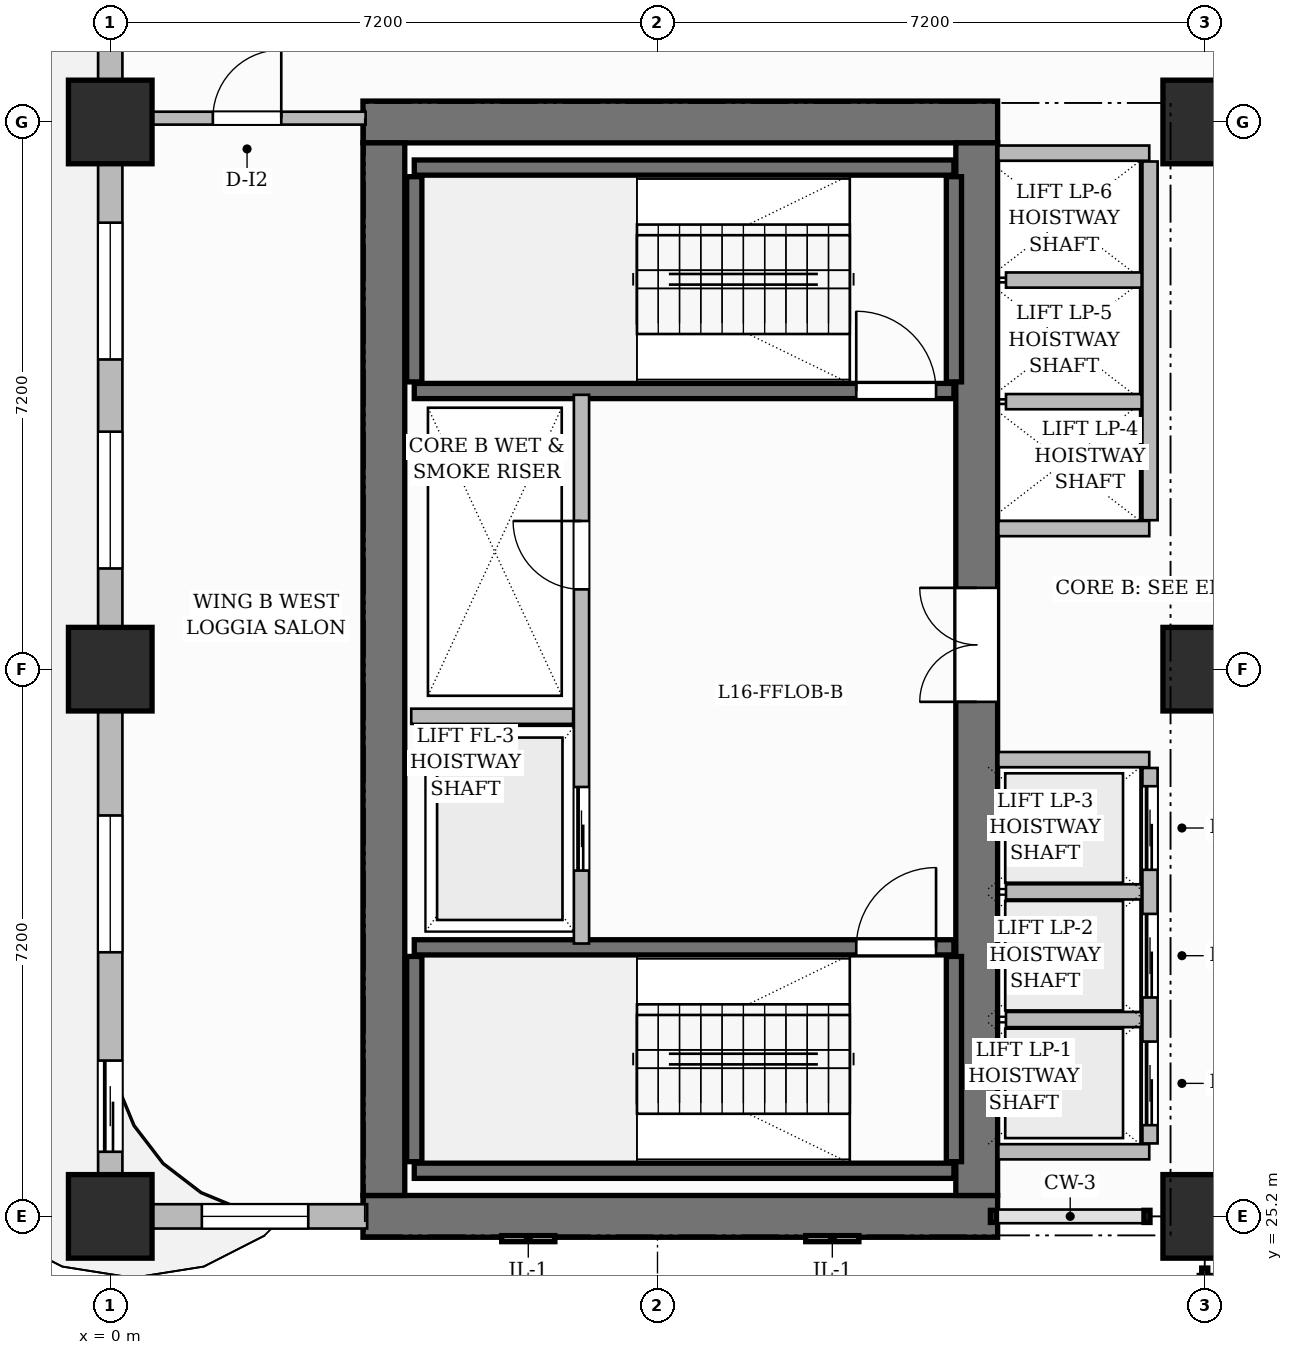
"""IFC4 building model, lengths in metres.
Left out: names, types, materials, properties, quantities, classifications, styles, units other than length and angle.
Written with IfcOpenShell. Run it as: python <this file> out.ifc"""

import sys

from ifc_helpers import new_model, si_unit, direction, frame, frame_2d, origin, origin_2d, place, context, subcontext, project, spatial, rectangle, extrude, source, transform, mapped, element, fill, save


model = new_model("IFC4")
c1 = context("Model", 3, precision=1e-05, world=origin(), true_north=direction((0.0, 1.0)))
c2 = subcontext(c1, "Body", "Model", "MODEL_VIEW")
j1 = project(units=[si_unit("LENGTHUNIT", "METRE"), si_unit("PLANEANGLEUNIT", "RADIAN")], contexts=[c1])
p1 = place(None, origin())
s1 = spatial("IfcSite", under=j1, at=p1, CompositionType="ELEMENT")
p2 = place(p1, origin())
s2 = spatial("IfcBuilding", under=s1, at=p2, CompositionType="ELEMENT")
p3 = place(p2, frame((0.0, 0.0, 69.4)))
s3 = spatial("IfcBuildingStorey", under=s2, at=p3, CompositionType="ELEMENT", Elevation=69.4)
for number, where, z_axis, x_axis in (
    (1, (3.325, 25.2, 0.0), (0.0, 0.0, 1.0), (1.0, 0.0, 0.0)),
    (2, (3.325, 39.6, 0.0), (0.0, 0.0, 1.0), (1.0, 0.0, 0.0)),
):
    element("IfcWall", number, at=place(p3, frame(where, z_axis=z_axis, x_axis=x_axis)), inside=s3, PredefinedType="SHEAR", context=c2, shape_type="SweptSolid", body=[
        extrude(rectangle(XDim=8.35, YDim=0.55, at=frame_2d((4.175, 0.0))), origin(), (0.0, 0.0, 1.0), 3.7),
    ])
p4 = place(p3, frame((3.6, 25.475, 0.0), z_axis=(0.0, 0.0, 1.0), x_axis=(0.0, 1.0, 0.0)))
e3 = element("IfcWall", 3, at=p4, inside=s3, PredefinedType="SHEAR", context=c2, shape_type="SweptSolid", body=[
    extrude(rectangle(XDim=13.85, YDim=0.55, at=frame_2d((6.925, 0.0))), origin(), (0.0, 0.0, 1.0), 3.7),
])
p5 = place(p3, frame((11.4, 25.475, 0.0), z_axis=(0.0, 0.0, 1.0), x_axis=(0.0, 1.0, 0.0)))
e4 = element("IfcWall", 4, at=p5, inside=s3, PredefinedType="SHEAR", context=c2, shape_type="SweptSolid", body=[
    extrude(rectangle(XDim=13.85, YDim=0.55, at=frame_2d((6.925, 0.0))), origin(), (0.0, 0.0, 1.0), 3.7),
])
p6 = place(p5, frame((6.495, 0.0, 0.0)))
e5 = element("IfcOpeningElement", 5, at=p6, cuts=e4, PredefinedType="OPENING", context=c2, shape_type="SweptSolid", body=[
    extrude(rectangle(XDim=1.5, YDim=2.2, at=frame_2d((0.75, 1.1))), frame((0.0, 0.285, 0.0), z_axis=(0.0, -1.0, 0.0), x_axis=(1.0, 0.0, 0.0)), (0.0, 0.0, 1.0), 0.57),
])
m1 = source(origin(), c2, "Body", "SweptSolid", [
    extrude(rectangle(XDim=1.1, YDim=1.1, at=origin_2d()), origin(), (0.0, 0.0, 1.0), 3.7),
])
for number, where, z_axis, x_axis in (
    (6, (0.0, 25.2, 0.0), (0.0, 0.0, 1.0), (1.0, 0.0, 0.0)),
    (7, (0.0, 32.4, 0.0), (0.0, 0.0, 1.0), (1.0, 0.0, 0.0)),
    (8, (0.0, 39.6, 0.0), (0.0, 0.0, 1.0), (1.0, 0.0, 0.0)),
    (9, (14.4, 25.2, 0.0), (0.0, 0.0, 1.0), (1.0, 0.0, 0.0)),
    (10, (14.4, 32.4, 0.0), (0.0, 0.0, 1.0), (1.0, 0.0, 0.0)),
    (11, (14.4, 39.6, 0.0), (0.0, 0.0, 1.0), (1.0, 0.0, 0.0)),
):
    element("IfcColumn", number, at=place(p3, frame(where, z_axis=z_axis, x_axis=x_axis)), inside=s3, PredefinedType="COLUMN", context=c2, shape_type="MappedRepresentation", body=[
        mapped(m1, transform((0.0, 0.0, 0.0), scale=1.0)),
    ])
p7 = place(p3, frame((4.0, 25.8, 0.0), z_axis=(0.0, 0.0, 1.0), x_axis=(1.0, 0.0, 0.0)))
e12 = element("IfcWall", 12, at=p7, inside=s3, PredefinedType="SHEAR", context=c2, shape_type="SweptSolid", body=[
    extrude(rectangle(XDim=7.1, YDim=0.2, at=frame_2d((3.55, 0.0))), origin(), (0.0, 0.0, 1.0), 3.7),
])
for number, where, z_axis, x_axis in (
    (13, (4.0, 25.92, 0.0), (0.0, 0.0, 1.0), (0.0, 1.0, 0.0)),
    (14, (11.1, 25.92, 0.0), (0.0, 0.0, 1.0), (0.0, 1.0, 0.0)),
):
    element("IfcWall", number, at=place(p3, frame(where, z_axis=z_axis, x_axis=x_axis)), inside=s3, PredefinedType="SHEAR", context=c2, shape_type="SweptSolid", body=[
        extrude(rectangle(XDim=2.7, YDim=0.2, at=frame_2d((1.35, 0.0))), origin(), (0.0, 0.0, 1.0), 3.7),
    ])
p8 = place(p3, frame((4.0, 28.74, 0.0), z_axis=(0.0, 0.0, 1.0), x_axis=(1.0, 0.0, 0.0)))
e15 = element("IfcWall", 15, at=p8, inside=s3, PredefinedType="SHEAR", context=c2, shape_type="SweptSolid", body=[
    extrude(rectangle(XDim=7.1, YDim=0.2, at=frame_2d((3.55, 0.0))), origin(), (0.0, 0.0, 1.0), 3.7),
])
p9 = place(p8, frame((5.815, 0.0, 0.0)))
e16 = element("IfcOpeningElement", 16, at=p9, cuts=e15, PredefinedType="OPENING", context=c2, shape_type="SweptSolid", body=[
    extrude(rectangle(XDim=1.05, YDim=2.2, at=frame_2d((0.525, 1.1))), frame((0.0, 0.11, 0.0), z_axis=(0.0, -1.0, 0.0), x_axis=(1.0, 0.0, 0.0)), (0.0, 0.0, 1.0), 0.22),
])
p10 = place(p3, frame((4.0, 39.0, 0.0), z_axis=(0.0, 0.0, 1.0), x_axis=(1.0, 0.0, 0.0)))
e17 = element("IfcWall", 17, at=p10, inside=s3, PredefinedType="SHEAR", context=c2, shape_type="SweptSolid", body=[
    extrude(rectangle(XDim=7.1, YDim=0.2, at=frame_2d((3.55, 0.0))), origin(), (0.0, 0.0, 1.0), 3.7),
])
for number, where, z_axis, x_axis in (
    (18, (4.0, 36.18, 0.0), (0.0, 0.0, 1.0), (0.0, 1.0, 0.0)),
    (19, (11.1, 36.18, 0.0), (0.0, 0.0, 1.0), (0.0, 1.0, 0.0)),
):
    element("IfcWall", number, at=place(p3, frame(where, z_axis=z_axis, x_axis=x_axis)), inside=s3, PredefinedType="SHEAR", context=c2, shape_type="SweptSolid", body=[
        extrude(rectangle(XDim=2.7, YDim=0.2, at=frame_2d((1.35, 0.0))), origin(), (0.0, 0.0, 1.0), 3.7),
    ])
p11 = place(p3, frame((4.0, 36.06, 0.0), z_axis=(0.0, 0.0, 1.0), x_axis=(1.0, 0.0, 0.0)))
e20 = element("IfcWall", 20, at=p11, inside=s3, PredefinedType="SHEAR", context=c2, shape_type="SweptSolid", body=[
    extrude(rectangle(XDim=7.1, YDim=0.2, at=frame_2d((3.55, 0.0))), origin(), (0.0, 0.0, 1.0), 3.7),
])
p12 = place(p11, frame((5.815, 0.0, 0.0)))
e21 = element("IfcOpeningElement", 21, at=p12, cuts=e20, PredefinedType="OPENING", context=c2, shape_type="SweptSolid", body=[
    extrude(rectangle(XDim=1.05, YDim=2.2, at=frame_2d((0.525, 1.1))), frame((0.0, 0.11, 0.0), z_axis=(0.0, -1.0, 0.0), x_axis=(1.0, 0.0, 0.0)), (0.0, 0.0, 1.0), 0.22),
])
p13 = place(p3, frame((6.2, 28.79, 0.0), z_axis=(0.0, 0.0, 1.0), x_axis=(0.0, 1.0, 0.0)))
e22 = element("IfcWall", 22, at=p13, inside=s3, PredefinedType="PARTITIONING", context=c2, shape_type="SweptSolid", body=[
    extrude(rectangle(XDim=7.22, YDim=0.2, at=frame_2d((3.61, 0.0))), origin(), (0.0, 0.0, 1.0), 3.45),
])
p14 = place(p13, frame((4.66, 0.0, 0.0)))
e23 = element("IfcOpeningElement", 23, at=p14, cuts=e22, PredefinedType="OPENING", context=c2, shape_type="SweptSolid", body=[
    extrude(rectangle(XDim=0.9, YDim=2.1, at=frame_2d((0.45, 1.05))), frame((0.0, 0.11, 0.0), z_axis=(0.0, -1.0, 0.0), x_axis=(1.0, 0.0, 0.0)), (0.0, 0.0, 1.0), 0.22),
])
p15 = place(p13, frame((0.96, 0.0, 0.0)))
e24 = element("IfcOpeningElement", 24, at=p15, cuts=e22, PredefinedType="OPENING", context=c2, shape_type="SweptSolid", body=[
    extrude(rectangle(XDim=1.1, YDim=2.2, at=frame_2d((0.55, 1.1))), frame((0.0, 0.11, 0.0), z_axis=(0.0, -1.0, 0.0), x_axis=(1.0, 0.0, 0.0)), (0.0, 0.0, 1.0), 0.22),
])
p16 = place(p3, frame((3.96, 31.78, 0.0), z_axis=(0.0, 0.0, 1.0), x_axis=(1.0, 0.0, 0.0)))
e25 = element("IfcWall", 25, at=p16, inside=s3, PredefinedType="PARTITIONING", context=c2, shape_type="SweptSolid", body=[
    extrude(rectangle(XDim=2.13, YDim=0.2, at=frame_2d((1.065, 0.0))), origin(), (0.0, 0.0, 1.0), 3.45),
])
for number, where, z_axis, x_axis in (
    (26, (11.685, 26.05, 0.0), (0.0, 0.0, 1.0), (1.0, 0.0, 0.0)),
    (27, (11.685, 31.21, 0.0), (0.0, 0.0, 1.0), (1.0, 0.0, 0.0)),
):
    element("IfcWall", number, at=place(p3, frame(where, z_axis=z_axis, x_axis=x_axis)), inside=s3, PredefinedType="PARTITIONING", context=c2, shape_type="SweptSolid", body=[
        extrude(rectangle(XDim=1.985, YDim=0.2, at=frame_2d((0.992, 0.0))), origin(), (0.0, 0.0, 1.0), 3.45),
    ])
p17 = place(p3, frame((13.68, 26.16, 0.0), z_axis=(0.0, 0.0, 1.0), x_axis=(0.0, 1.0, 0.0)))
e28 = element("IfcWall", 28, at=p17, inside=s3, PredefinedType="PARTITIONING", context=c2, shape_type="SweptSolid", body=[
    extrude(rectangle(XDim=4.94, YDim=0.2, at=frame_2d((2.47, 0.0))), origin(), (0.0, 0.0, 1.0), 3.45),
])
p18 = place(p17, frame((0.24, 0.0, 0.0)))
e29 = element("IfcOpeningElement", 29, at=p18, cuts=e28, PredefinedType="OPENING", context=c2, shape_type="SweptSolid", body=[
    extrude(rectangle(XDim=1.1, YDim=2.2, at=frame_2d((0.55, 1.1))), frame((0.0, 0.11, 0.0), z_axis=(0.0, -1.0, 0.0), x_axis=(1.0, 0.0, 0.0)), (0.0, 0.0, 1.0), 0.22),
])
p19 = place(p17, frame((1.92, 0.0, 0.0)))
e30 = element("IfcOpeningElement", 30, at=p19, cuts=e28, PredefinedType="OPENING", context=c2, shape_type="SweptSolid", body=[
    extrude(rectangle(XDim=1.1, YDim=2.2, at=frame_2d((0.55, 1.1))), frame((0.0, 0.11, 0.0), z_axis=(0.0, -1.0, 0.0), x_axis=(1.0, 0.0, 0.0)), (0.0, 0.0, 1.0), 0.22),
])
p20 = place(p17, frame((3.6, 0.0, 0.0)))
e31 = element("IfcOpeningElement", 31, at=p20, cuts=e28, PredefinedType="OPENING", context=c2, shape_type="SweptSolid", body=[
    extrude(rectangle(XDim=1.1, YDim=2.2, at=frame_2d((0.55, 1.1))), frame((0.0, 0.11, 0.0), z_axis=(0.0, -1.0, 0.0), x_axis=(1.0, 0.0, 0.0)), (0.0, 0.0, 1.0), 0.22),
])
for number, where, z_axis, x_axis in (
    (32, (11.785, 27.79, 0.0), (0.0, 0.0, 1.0), (1.0, 0.0, 0.0)),
    (33, (11.785, 29.47, 0.0), (0.0, 0.0, 1.0), (1.0, 0.0, 0.0)),
):
    element("IfcWall", number, at=place(p3, frame(where, z_axis=z_axis, x_axis=x_axis)), inside=s3, PredefinedType="PARTITIONING", context=c2, shape_type="SweptSolid", body=[
        extrude(rectangle(XDim=1.785, YDim=0.2, at=frame_2d((0.893, 0.0))), origin(), (0.0, 0.0, 1.0), 3.45),
    ])
for number, where, z_axis, x_axis in (
    (34, (11.685, 34.25, 0.0), (0.0, 0.0, 1.0), (1.0, 0.0, 0.0)),
    (35, (11.685, 39.19, 0.0), (0.0, 0.0, 1.0), (1.0, 0.0, 0.0)),
):
    element("IfcWall", number, at=place(p3, frame(where, z_axis=z_axis, x_axis=x_axis)), inside=s3, PredefinedType="PARTITIONING", context=c2, shape_type="SweptSolid", body=[
        extrude(rectangle(XDim=1.985, YDim=0.2, at=frame_2d((0.992, 0.0))), origin(), (0.0, 0.0, 1.0), 3.45),
    ])
p21 = place(p3, frame((13.68, 34.36, 0.0), z_axis=(0.0, 0.0, 1.0), x_axis=(0.0, 1.0, 0.0)))
e36 = element("IfcWall", 36, at=p21, inside=s3, PredefinedType="PARTITIONING", context=c2, shape_type="SweptSolid", body=[
    extrude(rectangle(XDim=4.72, YDim=0.2, at=frame_2d((2.36, 0.0))), origin(), (0.0, 0.0, 1.0), 3.45),
])
for number, where, z_axis, x_axis in (
    (37, (11.785, 35.92, 0.0), (0.0, 0.0, 1.0), (1.0, 0.0, 0.0)),
    (38, (11.785, 37.52, 0.0), (0.0, 0.0, 1.0), (1.0, 0.0, 0.0)),
):
    element("IfcWall", number, at=place(p3, frame(where, z_axis=z_axis, x_axis=x_axis)), inside=s3, PredefinedType="PARTITIONING", context=c2, shape_type="SweptSolid", body=[
        extrude(rectangle(XDim=1.785, YDim=0.2, at=frame_2d((0.893, 0.0))), origin(), (0.0, 0.0, 1.0), 3.45),
    ])
p22 = place(p3, frame((0.24, 39.65, 0.0), z_axis=(0.0, 0.0, 1.0), x_axis=(1.0, 0.0, 0.0)))
e39 = element("IfcWall", 39, at=p22, inside=s3, PredefinedType="PARTITIONING", context=c2, shape_type="SweptSolid", body=[
    extrude(rectangle(XDim=3.12, YDim=0.17, at=frame_2d((1.56, 0.0))), origin(), (0.0, 0.0, 1.0), 3.45),
])
p23 = place(p22, frame((1.11, 0.0, 0.0)))
e40 = element("IfcOpeningElement", 40, at=p23, cuts=e39, PredefinedType="OPENING", context=c2, shape_type="SweptSolid", body=[
    extrude(rectangle(XDim=0.9, YDim=2.15, at=frame_2d((0.45, 1.075))), frame((0.0, 0.095, 0.0), z_axis=(0.0, -1.0, 0.0), x_axis=(1.0, 0.0, 0.0)), (0.0, 0.0, 1.0), 0.19),
])
p24 = place(p3, frame((0.0, 25.2, 0.0), z_axis=(0.0, 0.0, 1.0), x_axis=(1.0, 0.0, 0.0)))
e41 = element("IfcWall", 41, at=p24, inside=s3, PredefinedType="SOLIDWALL", context=c2, shape_type="SweptSolid", body=[
    extrude(rectangle(XDim=3.38, YDim=0.32, at=frame_2d((1.69, 0.0))), origin(), (0.0, 0.0, 1.0), 3.45),
])
p25 = place(p24, frame((1.205, 0.0, 0.8)))
e42 = element("IfcOpeningElement", 42, at=p25, cuts=e41, PredefinedType="OPENING", context=c2, shape_type="SweptSolid", body=[
    extrude(rectangle(XDim=1.4, YDim=1.85, at=frame_2d((0.7, 0.925))), frame((0.0, 0.17, 0.0), z_axis=(0.0, -1.0, 0.0), x_axis=(1.0, 0.0, 0.0)), (0.0, 0.0, 1.0), 0.34),
])
p26 = place(p3, frame((0.0, 25.25, 0.0), z_axis=(0.0, 0.0, 1.0), x_axis=(0.0, 1.0, 0.0)))
e43 = element("IfcWall", 43, at=p26, inside=s3, PredefinedType="SOLIDWALL", context=c2, shape_type="SweptSolid", body=[
    extrude(rectangle(XDim=21.5, YDim=0.32, at=frame_2d((10.75, 0.0))), origin(), (0.0, 0.0, 1.0), 2.885),
])
p27 = place(p26, frame((18.45, 0.0, 0.0)))
e44 = element("IfcOpeningElement", 44, at=p27, cuts=e43, PredefinedType="OPENING", context=c2, shape_type="SweptSolid", body=[
    extrude(rectangle(XDim=1.2, YDim=2.2, at=frame_2d((0.6, 1.1))), frame((0.0, 0.17, 0.0), z_axis=(0.0, -1.0, 0.0), x_axis=(1.0, 0.0, 0.0)), (0.0, 0.0, 1.0), 0.34),
])
p28 = place(p26, frame((0.8, 0.0, 0.0)))
e45 = element("IfcOpeningElement", 45, at=p28, cuts=e43, PredefinedType="OPENING", context=c2, shape_type="SweptSolid", body=[
    extrude(rectangle(XDim=1.2, YDim=2.2, at=frame_2d((0.6, 1.1))), frame((0.0, 0.17, 0.0), z_axis=(0.0, -1.0, 0.0), x_axis=(1.0, 0.0, 0.0)), (0.0, 0.0, 1.0), 0.34),
])
p29 = place(p26, frame((3.425, 0.0, 0.8)))
e46 = element("IfcOpeningElement", 46, at=p29, cuts=e43, PredefinedType="OPENING", context=c2, shape_type="SweptSolid", body=[
    extrude(rectangle(XDim=1.8, YDim=1.85, at=frame_2d((0.9, 0.925))), frame((0.0, 0.17, 0.0), z_axis=(0.0, -1.0, 0.0), x_axis=(1.0, 0.0, 0.0)), (0.0, 0.0, 1.0), 0.34),
])
p30 = place(p26, frame((8.475, 0.0, 0.8)))
e47 = element("IfcOpeningElement", 47, at=p30, cuts=e43, PredefinedType="OPENING", context=c2, shape_type="SweptSolid", body=[
    extrude(rectangle(XDim=1.8, YDim=1.85, at=frame_2d((0.9, 0.925))), frame((0.0, 0.17, 0.0), z_axis=(0.0, -1.0, 0.0), x_axis=(1.0, 0.0, 0.0)), (0.0, 0.0, 1.0), 0.34),
])
p31 = place(p26, frame((11.225, 0.0, 0.8)))
e48 = element("IfcOpeningElement", 48, at=p31, cuts=e43, PredefinedType="OPENING", context=c2, shape_type="SweptSolid", body=[
    extrude(rectangle(XDim=1.8, YDim=1.85, at=frame_2d((0.9, 0.925))), frame((0.0, 0.17, 0.0), z_axis=(0.0, -1.0, 0.0), x_axis=(1.0, 0.0, 0.0)), (0.0, 0.0, 1.0), 0.34),
])
p32 = place(p26, frame((15.75, 0.0, 0.8)))
e49 = element("IfcOpeningElement", 49, at=p32, cuts=e43, PredefinedType="OPENING", context=c2, shape_type="SweptSolid", body=[
    extrude(rectangle(XDim=1.8, YDim=1.85, at=frame_2d((0.9, 0.925))), frame((0.0, 0.17, 0.0), z_axis=(0.0, -1.0, 0.0), x_axis=(1.0, 0.0, 0.0)), (0.0, 0.0, 1.0), 0.34),
])
m2 = source(origin(), c2, "Body", "SweptSolid", [
    extrude(rectangle(XDim=1.05, YDim=2.2, at=frame_2d((0.525, 1.1))), frame((0.0, 0.025, 0.0), z_axis=(0.0, -1.0, 0.0), x_axis=(1.0, 0.0, 0.0)), (0.0, 0.0, 1.0), 0.05),
])
p33 = place(p9, origin())
e50 = element("IfcDoor", 50, at=p33, inside=s3, OperationType="SINGLE_SWING_RIGHT", PredefinedType="DOOR", context=c2, shape_type="MappedRepresentation", body=[
    mapped(m2, transform((0.0, 0.0, 0.0), scale=1.0)),
])
fill(e16, e50)
p34 = place(p12, origin())
e51 = element("IfcDoor", 51, at=p34, inside=s3, OperationType="SINGLE_SWING_LEFT", PredefinedType="DOOR", context=c2, shape_type="MappedRepresentation", body=[
    mapped(m2, transform((0.0, 0.0, 0.0), scale=1.0)),
])
fill(e21, e51)
m3 = source(origin(), c2, "Body", "SweptSolid", [
    extrude(rectangle(XDim=0.9, YDim=2.1, at=frame_2d((0.45, 1.05))), frame((0.0, 0.025, 0.0), z_axis=(0.0, -1.0, 0.0), x_axis=(1.0, 0.0, 0.0)), (0.0, 0.0, 1.0), 0.05),
])
p35 = place(p14, origin())
e52 = element("IfcDoor", 52, at=p35, inside=s3, OperationType="SINGLE_SWING_RIGHT", PredefinedType="DOOR", context=c2, shape_type="MappedRepresentation", body=[
    mapped(m3, transform((0.0, 0.0, 0.0), scale=1.0)),
])
fill(e23, e52)
m4 = source(origin(), c2, "Body", "SweptSolid", [
    extrude(rectangle(XDim=1.5, YDim=2.2, at=frame_2d((0.75, 1.1))), frame((0.0, 0.025, 0.0), z_axis=(0.0, -1.0, 0.0), x_axis=(1.0, 0.0, 0.0)), (0.0, 0.0, 1.0), 0.05),
])
p36 = place(p6, origin())
e53 = element("IfcDoor", 53, at=p36, inside=s3, OperationType="DOUBLE_DOOR_SINGLE_SWING", PredefinedType="DOOR", context=c2, shape_type="MappedRepresentation", body=[
    mapped(m4, transform((0.0, 0.0, 0.0), scale=1.0)),
])
fill(e5, e53)
m5 = source(origin(), c2, "Body", "SweptSolid", [
    extrude(rectangle(XDim=0.9, YDim=2.15, at=frame_2d((0.45, 1.075))), frame((0.0, 0.025, 0.0), z_axis=(0.0, -1.0, 0.0), x_axis=(1.0, 0.0, 0.0)), (0.0, 0.0, 1.0), 0.05),
])
p37 = place(p23, origin())
e54 = element("IfcDoor", 54, at=p37, inside=s3, OperationType="SINGLE_SWING_RIGHT", PredefinedType="DOOR", context=c2, shape_type="MappedRepresentation", body=[
    mapped(m5, transform((0.0, 0.0, 0.0), scale=1.0)),
])
fill(e40, e54)
m6 = source(origin(), c2, "Body", "SweptSolid", [
    extrude(rectangle(XDim=1.1, YDim=2.2, at=frame_2d((0.55, 1.1))), frame((0.0, 0.025, 0.0), z_axis=(0.0, -1.0, 0.0), x_axis=(1.0, 0.0, 0.0)), (0.0, 0.0, 1.0), 0.05),
])
p38 = place(p15, origin())
e55 = element("IfcDoor", 55, at=p38, inside=s3, OperationType="SLIDING_TO_LEFT", PredefinedType="DOOR", context=c2, shape_type="MappedRepresentation", body=[
    mapped(m6, transform((0.0, 0.0, 0.0), scale=1.0)),
])
fill(e24, e55)
p39 = place(p18, origin())
e56 = element("IfcDoor", 56, at=p39, inside=s3, OperationType="SLIDING_TO_LEFT", PredefinedType="DOOR", context=c2, shape_type="MappedRepresentation", body=[
    mapped(m6, transform((0.0, 0.0, 0.0), scale=1.0)),
])
fill(e29, e56)
p40 = place(p19, origin())
e57 = element("IfcDoor", 57, at=p40, inside=s3, OperationType="SLIDING_TO_LEFT", PredefinedType="DOOR", context=c2, shape_type="MappedRepresentation", body=[
    mapped(m6, transform((0.0, 0.0, 0.0), scale=1.0)),
])
fill(e30, e57)
p41 = place(p20, origin())
e58 = element("IfcDoor", 58, at=p41, inside=s3, OperationType="SLIDING_TO_LEFT", PredefinedType="DOOR", context=c2, shape_type="MappedRepresentation", body=[
    mapped(m6, transform((0.0, 0.0, 0.0), scale=1.0)),
])
fill(e31, e58)
m7 = source(origin(), c2, "Body", "SweptSolid", [
    extrude(rectangle(XDim=1.2, YDim=2.2, at=frame_2d((0.6, 1.1))), frame((0.0, 0.025, 0.0), z_axis=(0.0, -1.0, 0.0), x_axis=(1.0, 0.0, 0.0)), (0.0, 0.0, 1.0), 0.05),
])
p42 = place(p28, origin())
e59 = element("IfcDoor", 59, at=p42, inside=s3, OperationType="SLIDING_TO_LEFT", PredefinedType="DOOR", context=c2, shape_type="MappedRepresentation", body=[
    mapped(m7, transform((0.0, 0.0, 0.0), scale=1.0)),
])
fill(e45, e59)
m8 = source(origin(), c2, "Body", "SweptSolid", [
    extrude(rectangle(XDim=1.4, YDim=1.85, at=frame_2d((0.7, 0.925))), frame((0.0, 0.03, 0.0), z_axis=(0.0, -1.0, 0.0), x_axis=(1.0, 0.0, 0.0)), (0.0, 0.0, 1.0), 0.06),
])
p43 = place(p25, origin())
e60 = element("IfcWindow", 60, at=p43, inside=s3, PartitioningType="SINGLE_PANEL", PredefinedType="WINDOW", context=c2, shape_type="MappedRepresentation", body=[
    mapped(m8, transform((0.0, 0.0, 0.0), scale=1.0)),
])
fill(e42, e60)
m9 = source(origin(), c2, "Body", "SweptSolid", [
    extrude(rectangle(XDim=1.8, YDim=1.85, at=frame_2d((0.9, 0.925))), frame((0.0, 0.03, 0.0), z_axis=(0.0, -1.0, 0.0), x_axis=(1.0, 0.0, 0.0)), (0.0, 0.0, 1.0), 0.06),
])
p44 = place(p29, origin())
e61 = element("IfcWindow", 61, at=p44, inside=s3, PartitioningType="DOUBLE_PANEL_VERTICAL", PredefinedType="WINDOW", context=c2, shape_type="MappedRepresentation", body=[
    mapped(m9, transform((0.0, 0.0, 0.0), scale=1.0)),
])
fill(e46, e61)
p45 = place(p30, origin())
e62 = element("IfcWindow", 62, at=p45, inside=s3, PartitioningType="DOUBLE_PANEL_VERTICAL", PredefinedType="WINDOW", context=c2, shape_type="MappedRepresentation", body=[
    mapped(m9, transform((0.0, 0.0, 0.0), scale=1.0)),
])
fill(e47, e62)
p46 = place(p31, origin())
e63 = element("IfcWindow", 63, at=p46, inside=s3, PartitioningType="DOUBLE_PANEL_VERTICAL", PredefinedType="WINDOW", context=c2, shape_type="MappedRepresentation", body=[
    mapped(m9, transform((0.0, 0.0, 0.0), scale=1.0)),
])
fill(e48, e63)
save(model, sys.argv[1])
